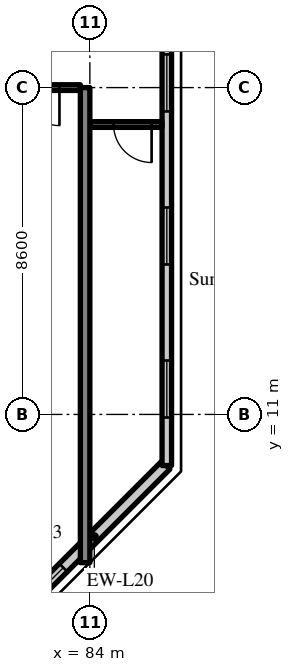
"""IFC4 building model, lengths in metres.
Left out: names, types, materials, properties, quantities, classifications, styles, units other than length and angle.
Written with IfcOpenShell. Run it as: python <this file> out.ifc"""

import sys

from ifc_helpers import new_model, si_unit, direction, frame, frame_2d, origin, place, context, subcontext, project, spatial, rectangle, extrude, source, transform, mapped, element, fill, save


model = new_model("IFC4")
c1 = context("Model", 3, precision=1e-05, world=origin(), true_north=direction((0.0, 1.0)))
c2 = subcontext(c1, "Body", "Model", "MODEL_VIEW")
j1 = project(units=[si_unit("LENGTHUNIT", "METRE"), si_unit("PLANEANGLEUNIT", "RADIAN")], contexts=[c1])
p1 = place(None, origin())
s1 = spatial("IfcSite", under=j1, at=p1, CompositionType="ELEMENT")
p2 = place(p1, origin())
s2 = spatial("IfcBuilding", under=s1, at=p2, CompositionType="ELEMENT")
p3 = place(p2, frame((0.0, 0.0, 297.7)))
s3 = spatial("IfcBuildingStorey", under=s2, at=p3, CompositionType="ELEMENT", Elevation=297.7)
m1 = source(origin(), c2, "Body", "SweptSolid", [
    extrude(rectangle(XDim=12.5, YDim=0.25, at=frame_2d((6.25, 0.0))), origin(), (0.0, 0.0, 1.0), 3.72),
])
p4 = place(p3, frame((83.875, 7.1, 0.0), z_axis=(0.0, 0.0, 1.0), x_axis=(0.0, 1.0, 0.0)))
e1 = element("IfcWall", 1, at=p4, inside=s3, PredefinedType="SHEAR", context=c2, shape_type="MappedRepresentation", body=[
    mapped(m1, transform((0.0, 0.0, 0.0), scale=1.0)),
])
m2 = source(origin(), c2, "Body", "SweptSolid", [
    extrude(rectangle(XDim=5.326, YDim=0.3, at=frame_2d((2.663, 0.0))), origin(), (0.0, 0.0, 1.0), 3.72),
])
p5 = place(p3, frame((82.234, 5.9, 0.0), z_axis=(0.0, 0.0, 1.0), x_axis=(0.707083859269, 0.707129702361, 0.0)))
e2 = element("IfcWall", 2, at=p5, inside=s3, PredefinedType="SOLIDWALL", context=c2, shape_type="MappedRepresentation", body=[
    mapped(m2, transform((0.0, 0.0, 0.0), scale=1.0)),
])
m3 = source(origin(), c2, "Body", "SweptSolid", [
    extrude(rectangle(XDim=1.2, YDim=1.5, at=frame_2d((0.6, 0.75))), frame((0.0, 0.16, 0.0), z_axis=(0.0, -1.0, 0.0), x_axis=(1.0, 0.0, 0.0)), (0.0, 0.0, 1.0), 0.32),
])
p6 = place(p5, frame((0.31, 0.0, 0.9)))
e3 = element("IfcOpeningElement", 3, at=p6, cuts=e2, PredefinedType="OPENING", context=c2, shape_type="MappedRepresentation", body=[
    mapped(m3, transform((0.0, 0.0, 0.0), scale=1.0)),
])
m4 = source(origin(), c2, "Body", "SweptSolid", [
    extrude(rectangle(XDim=28.189, YDim=0.25, at=frame_2d((14.095, 0.0))), origin(), (0.0, 0.0, 1.0), 3.72),
])
p7 = place(p3, frame((86.025, 9.655, 0.0), z_axis=(0.0, 0.0, 1.0), x_axis=(0.0, 1.0, 0.0)))
e4 = element("IfcWall", 4, at=p7, inside=s3, PredefinedType="SOLIDWALL", context=c2, shape_type="MappedRepresentation", body=[
    mapped(m4, transform((0.0, 0.0, 0.0), scale=1.0)),
])
m5 = source(origin(), c2, "Body", "SweptSolid", [
    extrude(rectangle(XDim=1.5, YDim=1.5, at=frame_2d((0.75, 0.75))), frame((0.0, 0.135, 0.0), z_axis=(0.0, -1.0, 0.0), x_axis=(1.0, 0.0, 0.0)), (0.0, 0.0, 1.0), 0.27),
])
p8 = place(p7, frame((1.263, 0.0, 0.9)))
e5 = element("IfcOpeningElement", 5, at=p8, cuts=e4, PredefinedType="OPENING", context=c2, shape_type="MappedRepresentation", body=[
    mapped(m5, transform((0.0, 0.0, 0.0), scale=1.0)),
])
p9 = place(p7, frame((5.291, 0.0, 0.9)))
e6 = element("IfcOpeningElement", 6, at=p9, cuts=e4, PredefinedType="OPENING", context=c2, shape_type="MappedRepresentation", body=[
    mapped(m5, transform((0.0, 0.0, 0.0), scale=1.0)),
])
p10 = place(p7, frame((9.318, 0.0, 0.9)))
e7 = element("IfcOpeningElement", 7, at=p10, cuts=e4, PredefinedType="OPENING", context=c2, shape_type="MappedRepresentation", body=[
    mapped(m5, transform((0.0, 0.0, 0.0), scale=1.0)),
])
p11 = place(p7, frame((13.345, 0.0, 0.9)))
e8 = element("IfcOpeningElement", 8, at=p11, cuts=e4, PredefinedType="OPENING", context=c2, shape_type="MappedRepresentation", body=[
    mapped(m5, transform((0.0, 0.0, 0.0), scale=1.0)),
])
p12 = place(p7, frame((17.372, 0.0, 0.9)))
e9 = element("IfcOpeningElement", 9, at=p12, cuts=e4, PredefinedType="OPENING", context=c2, shape_type="MappedRepresentation", body=[
    mapped(m5, transform((0.0, 0.0, 0.0), scale=1.0)),
])
p13 = place(p7, frame((21.399, 0.0, 0.9)))
e10 = element("IfcOpeningElement", 10, at=p13, cuts=e4, PredefinedType="OPENING", context=c2, shape_type="MappedRepresentation", body=[
    mapped(m5, transform((0.0, 0.0, 0.0), scale=1.0)),
])
p14 = place(p7, frame((25.426, 0.0, 0.9)))
e11 = element("IfcOpeningElement", 11, at=p14, cuts=e4, PredefinedType="OPENING", context=c2, shape_type="MappedRepresentation", body=[
    mapped(m5, transform((0.0, 0.0, 0.0), scale=1.0)),
])
m6 = source(origin(), c2, "Body", "SweptSolid", [
    extrude(rectangle(XDim=8.025, YDim=0.15, at=frame_2d((4.012, 0.0))), origin(), (0.0, 0.0, 1.0), 3.02),
])
p15 = place(p3, frame((75.725, 19.6, 0.0), z_axis=(0.0, 0.0, 1.0), x_axis=(1.0, 0.0, 0.0)))
e12 = element("IfcWall", 12, at=p15, inside=s3, PredefinedType="PARTITIONING", context=c2, shape_type="MappedRepresentation", body=[
    mapped(m6, transform((0.0, 0.0, 0.0), scale=1.0)),
])
m7 = source(origin(), c2, "Body", "SweptSolid", [
    extrude(rectangle(XDim=1.0, YDim=2.1, at=frame_2d((0.5, 1.05))), frame((0.0, 0.085, 0.0), z_axis=(0.0, -1.0, 0.0), x_axis=(1.0, 0.0, 0.0)), (0.0, 0.0, 1.0), 0.17),
])
p16 = place(p15, frame((6.475, 0.0, 0.0)))
e13 = element("IfcOpeningElement", 13, at=p16, cuts=e12, PredefinedType="OPENING", context=c2, shape_type="MappedRepresentation", body=[
    mapped(m7, transform((0.0, 0.0, 0.0), scale=1.0)),
])
m8 = source(origin(), c2, "Body", "SweptSolid", [
    extrude(rectangle(XDim=1.9, YDim=0.15, at=frame_2d((0.95, 0.0))), origin(), (0.0, 0.0, 1.0), 3.02),
])
p17 = place(p3, frame((84.0, 18.628, 0.0), z_axis=(0.0, 0.0, 1.0), x_axis=(1.0, 0.0, 0.0)))
e14 = element("IfcWall", 14, at=p17, inside=s3, PredefinedType="PARTITIONING", context=c2, shape_type="MappedRepresentation", body=[
    mapped(m8, transform((0.0, 0.0, 0.0), scale=1.0)),
])
p18 = place(p17, frame((0.625, 0.0, 0.0)))
e15 = element("IfcOpeningElement", 15, at=p18, cuts=e14, PredefinedType="OPENING", context=c2, shape_type="MappedRepresentation", body=[
    mapped(m7, transform((0.0, 0.0, 0.0), scale=1.0)),
])
m9 = source(origin(), c2, "Body", "SweptSolid", [
    extrude(rectangle(XDim=1.2, YDim=1.5, at=frame_2d((0.6, 0.75))), frame((0.0, 0.03, 0.0), z_axis=(0.0, -1.0, 0.0), x_axis=(1.0, 0.0, 0.0)), (0.0, 0.0, 1.0), 0.06),
])
p19 = place(p6, origin())
e16 = element("IfcWindow", 16, at=p19, inside=s3, PartitioningType="SINGLE_PANEL", PredefinedType="WINDOW", context=c2, shape_type="MappedRepresentation", body=[
    mapped(m9, transform((0.0, 0.0, 0.0), scale=1.0)),
])
fill(e3, e16)
m10 = source(origin(), c2, "Body", "SweptSolid", [
    extrude(rectangle(XDim=1.5, YDim=1.5, at=frame_2d((0.75, 0.75))), frame((0.0, 0.03, 0.0), z_axis=(0.0, -1.0, 0.0), x_axis=(1.0, 0.0, 0.0)), (0.0, 0.0, 1.0), 0.06),
])
p20 = place(p8, origin())
e17 = element("IfcWindow", 17, at=p20, inside=s3, PartitioningType="SINGLE_PANEL", PredefinedType="WINDOW", context=c2, shape_type="MappedRepresentation", body=[
    mapped(m10, transform((0.0, 0.0, 0.0), scale=1.0)),
])
fill(e5, e17)
p21 = place(p9, origin())
e18 = element("IfcWindow", 18, at=p21, inside=s3, PartitioningType="SINGLE_PANEL", PredefinedType="WINDOW", context=c2, shape_type="MappedRepresentation", body=[
    mapped(m10, transform((0.0, 0.0, 0.0), scale=1.0)),
])
fill(e6, e18)
p22 = place(p10, origin())
e19 = element("IfcWindow", 19, at=p22, inside=s3, PartitioningType="SINGLE_PANEL", PredefinedType="WINDOW", context=c2, shape_type="MappedRepresentation", body=[
    mapped(m10, transform((0.0, 0.0, 0.0), scale=1.0)),
])
fill(e7, e19)
m11 = source(origin(), c2, "Body", "SweptSolid", [
    extrude(rectangle(XDim=1.0, YDim=2.1, at=frame_2d((0.5, 1.05))), frame((0.0, 0.025, 0.0), z_axis=(0.0, -1.0, 0.0), x_axis=(1.0, 0.0, 0.0)), (0.0, 0.0, 1.0), 0.05),
])
p23 = place(p16, origin())
e20 = element("IfcDoor", 20, at=p23, inside=s3, OperationType="SINGLE_SWING_RIGHT", PredefinedType="DOOR", context=c2, shape_type="MappedRepresentation", body=[
    mapped(m11, transform((0.0, 0.0, 0.0), scale=1.0)),
])
fill(e13, e20)
p24 = place(p18, origin())
e21 = element("IfcDoor", 21, at=p24, inside=s3, OperationType="SINGLE_SWING_RIGHT", PredefinedType="DOOR", context=c2, shape_type="MappedRepresentation", body=[
    mapped(m11, transform((0.0, 0.0, 0.0), scale=1.0)),
])
fill(e15, e21)
save(model, sys.argv[1])
